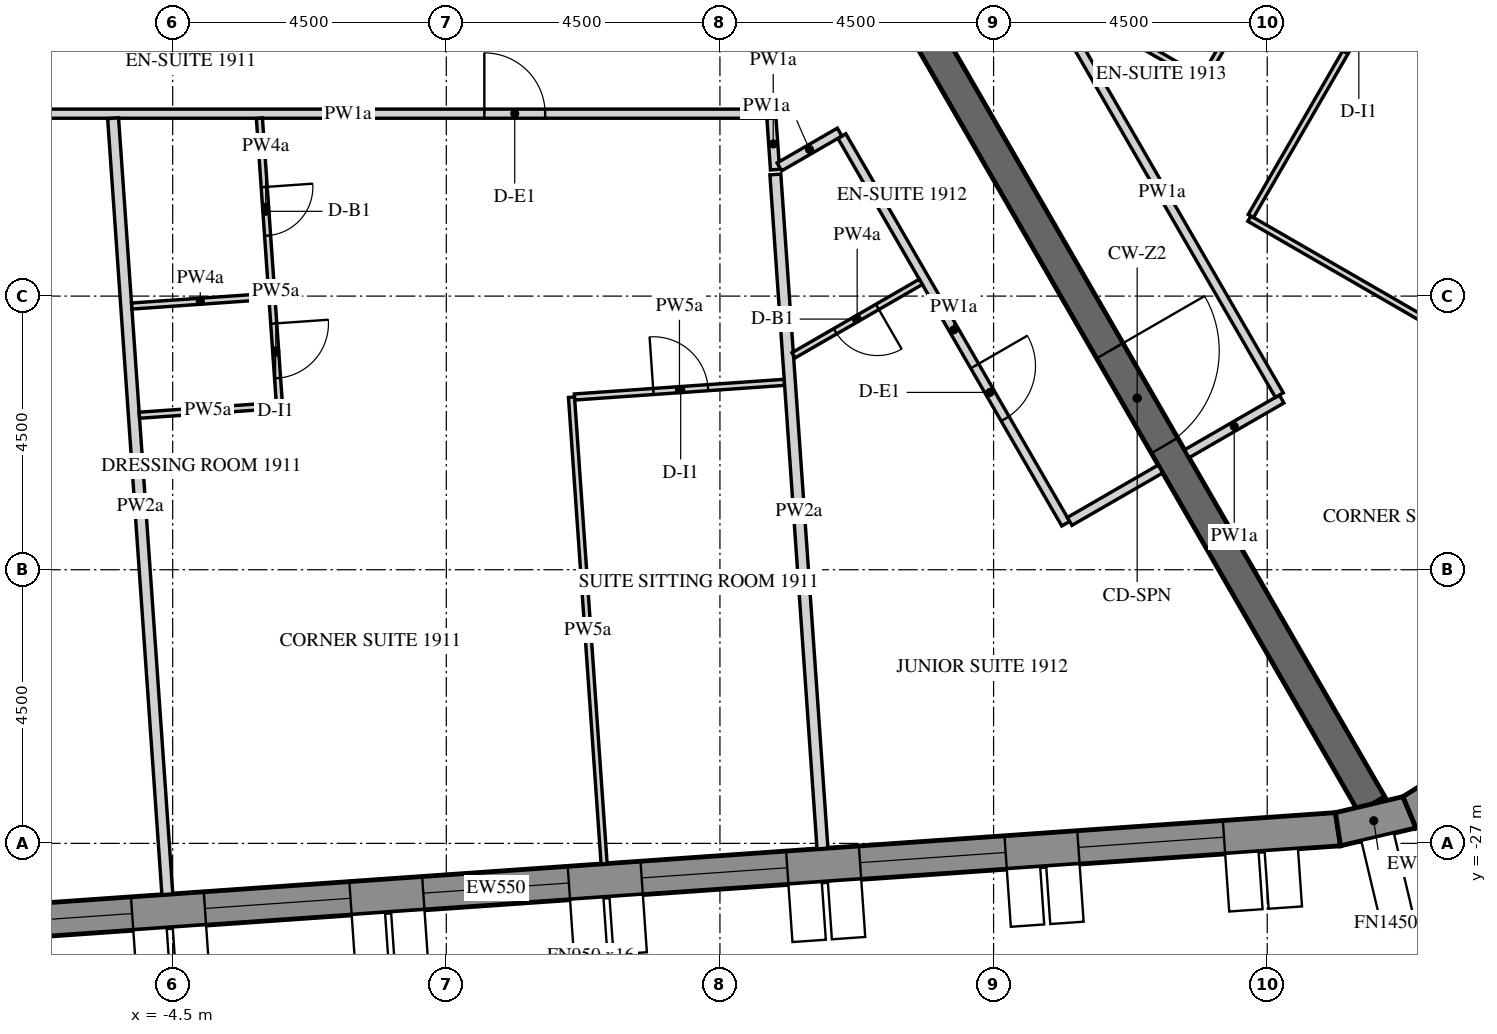
"""IFC4 building model, lengths in metres.
Left out: names, types, materials, properties, quantities, classifications, styles, units other than length and angle.
Written with IfcOpenShell. Run it as: python <this file> out.ifc"""

import sys

from ifc_helpers import new_model, si_unit, direction, frame, frame_2d, origin, place, context, subcontext, project, spatial, polyline, rectangle, outline, extrude, element, fill, save


model = new_model("IFC4")
c1 = context("Model", 3, precision=1e-05, world=origin(), true_north=direction((0.0, 1.0)))
c2 = subcontext(c1, "Body", "Model", "MODEL_VIEW")
j1 = project(units=[si_unit("LENGTHUNIT", "METRE"), si_unit("PLANEANGLEUNIT", "RADIAN")], contexts=[c1])
p1 = place(None, origin())
s1 = spatial("IfcSite", under=j1, at=p1, CompositionType="ELEMENT")
p2 = place(p1, origin())
s2 = spatial("IfcBuilding", under=s1, at=p2, CompositionType="ELEMENT")
p3 = place(p2, frame((0.0, 0.0, 238.5)))
s3 = spatial("IfcBuildingStorey", under=s2, at=p3, CompositionType="ELEMENT", Elevation=238.5)
p4 = place(p3, frame((-13.026, -28.704, -0.15), z_axis=(0.0, 0.0, 1.0), x_axis=(0.99756406806, 0.069756219185, 0.0)))
e1 = element("IfcWall", 1, at=p4, inside=s3, PredefinedType="SOLIDWALL", context=c2, shape_type="SweptSolid", body=[
    extrude(outline(polyline([(-0.026, -0.275), (27.78, -0.275), (27.735, 0.275), (0.026, 0.275), (-0.026, -0.275)])), origin(), (0.0, 0.0, 1.0), 3.9),
])
p5 = place(p4, frame((1.879, 0.0, 1.05)))
e2 = element("IfcOpeningElement", 2, at=p5, cuts=e1, PredefinedType="OPENING", context=c2, shape_type="SweptSolid", body=[
    extrude(rectangle(XDim=2.4, YDim=2.4, at=frame_2d((1.2, 1.2))), frame((0.0, 0.285, 0.0), z_axis=(0.0, -1.0, 0.0), x_axis=(1.0, 0.0, 0.0)), (0.0, 0.0, 1.0), 0.57),
])
p6 = place(p4, frame((5.479, 0.0, 1.05)))
e3 = element("IfcOpeningElement", 3, at=p6, cuts=e1, PredefinedType="OPENING", context=c2, shape_type="SweptSolid", body=[
    extrude(rectangle(XDim=2.4, YDim=2.4, at=frame_2d((1.2, 1.2))), frame((0.0, 0.285, 0.0), z_axis=(0.0, -1.0, 0.0), x_axis=(1.0, 0.0, 0.0)), (0.0, 0.0, 1.0), 0.57),
])
p7 = place(p4, frame((9.079, 0.0, 1.05)))
e4 = element("IfcOpeningElement", 4, at=p7, cuts=e1, PredefinedType="OPENING", context=c2, shape_type="SweptSolid", body=[
    extrude(rectangle(XDim=2.4, YDim=2.4, at=frame_2d((1.2, 1.2))), frame((0.0, 0.285, 0.0), z_axis=(0.0, -1.0, 0.0), x_axis=(1.0, 0.0, 0.0)), (0.0, 0.0, 1.0), 0.57),
])
p8 = place(p4, frame((12.679, 0.0, 1.05)))
e5 = element("IfcOpeningElement", 5, at=p8, cuts=e1, PredefinedType="OPENING", context=c2, shape_type="SweptSolid", body=[
    extrude(rectangle(XDim=2.4, YDim=2.4, at=frame_2d((1.2, 1.2))), frame((0.0, 0.285, 0.0), z_axis=(0.0, -1.0, 0.0), x_axis=(1.0, 0.0, 0.0)), (0.0, 0.0, 1.0), 0.57),
])
p9 = place(p4, frame((16.279, 0.0, 1.05)))
e6 = element("IfcOpeningElement", 6, at=p9, cuts=e1, PredefinedType="OPENING", context=c2, shape_type="SweptSolid", body=[
    extrude(rectangle(XDim=2.4, YDim=2.4, at=frame_2d((1.2, 1.2))), frame((0.0, 0.285, 0.0), z_axis=(0.0, -1.0, 0.0), x_axis=(1.0, 0.0, 0.0)), (0.0, 0.0, 1.0), 0.57),
])
p10 = place(p4, frame((19.879, 0.0, 1.05)))
e7 = element("IfcOpeningElement", 7, at=p10, cuts=e1, PredefinedType="OPENING", context=c2, shape_type="SweptSolid", body=[
    extrude(rectangle(XDim=2.4, YDim=2.4, at=frame_2d((1.2, 1.2))), frame((0.0, 0.285, 0.0), z_axis=(0.0, -1.0, 0.0), x_axis=(1.0, 0.0, 0.0)), (0.0, 0.0, 1.0), 0.57),
])
p11 = place(p4, frame((23.479, 0.0, 1.05)))
e8 = element("IfcOpeningElement", 8, at=p11, cuts=e1, PredefinedType="OPENING", context=c2, shape_type="SweptSolid", body=[
    extrude(rectangle(XDim=2.4, YDim=2.4, at=frame_2d((1.2, 1.2))), frame((0.0, 0.285, 0.0), z_axis=(0.0, -1.0, 0.0), x_axis=(1.0, 0.0, 0.0)), (0.0, 0.0, 1.0), 0.57),
])
p12 = place(p3, frame((14.664, -26.767, -0.15), z_axis=(0.0, 0.0, 1.0), x_axis=(0.973063591128, 0.230536868247, 0.0)))
e9 = element("IfcWall", 9, at=p12, inside=s3, PredefinedType="SOLIDWALL", context=c2, shape_type="SweptSolid", body=[
    extrude(outline(polyline([(-0.022, -0.275), (1.253, -0.275), (1.163, 0.275), (0.022, 0.275), (-0.022, -0.275)])), origin(), (0.0, 0.0, 1.0), 3.9),
])
p13 = place(p3, frame((15.84, -26.489, -0.15), z_axis=(0.0, 0.0, 1.0), x_axis=(0.848009655012, 0.52998077796, 0.0)))
e10 = element("IfcWall", 10, at=p13, inside=s3, PredefinedType="SOLIDWALL", context=c2, shape_type="SweptSolid", body=[
    extrude(outline(polyline([(-0.045, -0.275), (1.253, -0.275), (1.163, 0.275), (0.045, 0.275), (-0.045, -0.275)])), origin(), (0.0, 0.0, 1.0), 3.9),
])
p14 = place(p3, frame((7.506, -13.0, -0.15), z_axis=(0.0, 0.0, 1.0), x_axis=(0.499988271576, -0.866032175087, 0.0)))
e11 = element("IfcWall", 11, at=p14, inside=s3, PredefinedType="SHEAR", context=c2, shape_type="SweptSolid", body=[
    extrude(rectangle(XDim=15.424, YDim=0.5, at=frame_2d((7.712, 0.0))), origin(), (0.0, 0.0, 1.0), 3.9),
])
p15 = place(p14, frame((6.812, 0.0, 0.15)))
e12 = element("IfcOpeningElement", 12, at=p15, cuts=e11, PredefinedType="OPENING", context=c2, shape_type="SweptSolid", body=[
    extrude(rectangle(XDim=1.8, YDim=2.4, at=frame_2d((0.9, 1.2))), frame((0.0, 0.26, 0.0), z_axis=(0.0, -1.0, 0.0), x_axis=(1.0, 0.0, 0.0)), (0.0, 0.0, 1.0), 0.52),
])
p16 = place(p3, frame((-8.574, -15.0, 0.0), z_axis=(0.0, 0.0, 1.0), x_axis=(1.0, 0.0, 0.0)))
e13 = element("IfcWall", 13, at=p16, inside=s3, PredefinedType="PARTITIONING", context=c2, shape_type="SweptSolid", body=[
    extrude(rectangle(XDim=13.915, YDim=0.15, at=frame_2d((6.958, 0.0))), origin(), (0.0, 0.0, 1.0), 2.838),
])
p17 = place(p16, frame((1.001, 0.0, 0.0)))
e14 = element("IfcOpeningElement", 14, at=p17, cuts=e13, PredefinedType="OPENING", context=c2, shape_type="SweptSolid", body=[
    extrude(rectangle(XDim=1.0, YDim=2.1, at=frame_2d((0.5, 1.05))), frame((0.0, 0.085, 0.0), z_axis=(0.0, -1.0, 0.0), x_axis=(1.0, 0.0, 0.0)), (0.0, 0.0, 1.0), 0.17),
])
p18 = place(p16, frame((9.199, 0.0, 0.0)))
e15 = element("IfcOpeningElement", 15, at=p18, cuts=e13, PredefinedType="OPENING", context=c2, shape_type="SweptSolid", body=[
    extrude(rectangle(XDim=1.0, YDim=2.1, at=frame_2d((0.5, 1.05))), frame((0.0, 0.085, 0.0), z_axis=(0.0, -1.0, 0.0), x_axis=(1.0, 0.0, 0.0)), (0.0, 0.0, 1.0), 0.17),
])
p19 = place(p3, frame((5.347, -15.075, 0.0), z_axis=(0.0, 0.0, 1.0), x_axis=(0.069731635013, -0.997565786842, 0.0)))
e16 = element("IfcWall", 16, at=p19, inside=s3, PredefinedType="PARTITIONING", context=c2, shape_type="SweptSolid", body=[
    extrude(rectangle(XDim=0.847, YDim=0.15, at=frame_2d((0.424, 0.0))), origin(), (0.0, 0.0, 1.0), 2.838),
])
p20 = place(p3, frame((6.506, -15.368, 0.0), z_axis=(0.0, 0.0, 1.0), x_axis=(0.499995202058, -0.86602817386, 0.0)))
e17 = element("IfcWall", 17, at=p20, inside=s3, PredefinedType="PARTITIONING", context=c2, shape_type="SweptSolid", body=[
    extrude(rectangle(XDim=7.361, YDim=0.15, at=frame_2d((3.68, 0.0))), origin(), (0.0, 0.0, 1.0), 2.838),
])
p21 = place(p20, frame((4.368, 0.0, 0.0)))
e18 = element("IfcOpeningElement", 18, at=p21, cuts=e17, PredefinedType="OPENING", context=c2, shape_type="SweptSolid", body=[
    extrude(rectangle(XDim=1.0, YDim=2.1, at=frame_2d((0.5, 1.05))), frame((0.0, 0.085, 0.0), z_axis=(0.0, -1.0, 0.0), x_axis=(1.0, 0.0, 0.0)), (0.0, 0.0, 1.0), 0.17),
])
p22 = place(p3, frame((10.251, -21.705, 0.0), z_axis=(0.0, 0.0, 1.0), x_axis=(0.866013532718, 0.500020560727, 0.0)))
e19 = element("IfcWall", 19, at=p22, inside=s3, PredefinedType="PARTITIONING", context=c2, shape_type="SweptSolid", body=[
    extrude(rectangle(XDim=1.725, YDim=0.15, at=frame_2d((0.863, 0.0))), origin(), (0.0, 0.0, 1.0), 2.838),
])
p23 = place(p3, frame((5.478, -15.875, 0.0), z_axis=(0.0, 0.0, 1.0), x_axis=(0.866000689289, 0.500042804318, 0.0)))
e20 = element("IfcWall", 20, at=p23, inside=s3, PredefinedType="PARTITIONING", context=c2, shape_type="SweptSolid", body=[
    extrude(rectangle(XDim=1.144, YDim=0.15, at=frame_2d((0.572, 0.0))), origin(), (0.0, 0.0, 1.0), 2.838),
])
p24 = place(p3, frame((12.178, -20.593, 0.0), z_axis=(0.0, 0.0, 1.0), x_axis=(0.866047807691, 0.499961193289, 0.0)))
e21 = element("IfcWall", 21, at=p24, inside=s3, PredefinedType="PARTITIONING", context=c2, shape_type="SweptSolid", body=[
    extrude(rectangle(XDim=1.8, YDim=0.15, at=frame_2d((0.9, 0.0))), origin(), (0.0, 0.0, 1.0), 2.838),
])
p25 = place(p3, frame((13.699, -19.628, 0.0), z_axis=(0.0, 0.0, 1.0), x_axis=(-0.499993780622, 0.866028994514, 0.0)))
e22 = element("IfcWall", 22, at=p25, inside=s3, PredefinedType="PARTITIONING", context=c2, shape_type="SweptSolid", body=[
    extrude(rectangle(XDim=7.711, YDim=0.15, at=frame_2d((3.855, 0.0))), origin(), (0.0, 0.0, 1.0), 2.838),
])
p26 = place(p3, frame((-4.587, -27.838, 0.0), z_axis=(0.0, 0.0, 1.0), x_axis=(-0.069764754112, 0.997563471206, 0.0)))
e23 = element("IfcWall", 23, at=p26, inside=s3, PredefinedType="PARTITIONING", context=c2, shape_type="SweptSolid", body=[
    extrude(rectangle(XDim=12.794, YDim=0.18, at=frame_2d((6.397, 0.0))), origin(), (0.0, 0.0, 1.0), 2.838),
])
p27 = place(p3, frame((-3.074, -15.075, 0.0), z_axis=(0.0, 0.0, 1.0), x_axis=(0.069798496539, -0.99756111085, 0.0)))
e24 = element("IfcWall", 24, at=p27, inside=s3, PredefinedType="PARTITIONING", context=c2, shape_type="SweptSolid", body=[
    extrude(rectangle(XDim=2.935, YDim=0.1, at=frame_2d((1.467, 0.0))), origin(), (0.0, 0.0, 1.0), 2.838),
])
p28 = place(p27, frame((1.135, 0.0, 0.0)))
e25 = element("IfcOpeningElement", 25, at=p28, cuts=e24, PredefinedType="OPENING", context=c2, shape_type="SweptSolid", body=[
    extrude(rectangle(XDim=0.8, YDim=2.1, at=frame_2d((0.4, 1.05))), frame((0.0, 0.06, 0.0), z_axis=(0.0, -1.0, 0.0), x_axis=(1.0, 0.0, 0.0)), (0.0, 0.0, 1.0), 0.12),
])
p29 = place(p3, frame((-2.866, -18.052, 0.0), z_axis=(0.0, 0.0, 1.0), x_axis=(0.069750000204, -0.997564502913, 0.0)))
e26 = element("IfcWall", 26, at=p29, inside=s3, PredefinedType="PARTITIONING", context=c2, shape_type="SweptSolid", body=[
    extrude(rectangle(XDim=1.75, YDim=0.1, at=frame_2d((0.875, 0.0))), origin(), (0.0, 0.0, 1.0), 2.838),
])
p30 = place(p29, frame((0.4, 0.0, 0.0)))
e27 = element("IfcOpeningElement", 27, at=p30, cuts=e26, PredefinedType="OPENING", context=c2, shape_type="SweptSolid", body=[
    extrude(rectangle(XDim=0.9, YDim=2.1, at=frame_2d((0.45, 1.05))), frame((0.0, 0.06, 0.0), z_axis=(0.0, -1.0, 0.0), x_axis=(1.0, 0.0, 0.0)), (0.0, 0.0, 1.0), 0.12),
])
p31 = place(p3, frame((-2.793, -19.802, 0.0), z_axis=(0.0, 0.0, 1.0), x_axis=(-0.997562351999, -0.069780755754, 0.0)))
e28 = element("IfcWall", 28, at=p31, inside=s3, PredefinedType="PARTITIONING", context=c2, shape_type="SweptSolid", body=[
    extrude(rectangle(XDim=2.26, YDim=0.1, at=frame_2d((1.13, 0.0))), origin(), (0.0, 0.0, 1.0), 2.838),
])
p32 = place(p3, frame((2.595, -27.335, 0.0), z_axis=(0.0, 0.0, 1.0), x_axis=(-0.069769427287, 0.997563144375, 0.0)))
e29 = element("IfcWall", 29, at=p32, inside=s3, PredefinedType="PARTITIONING", context=c2, shape_type="SweptSolid", body=[
    extrude(rectangle(XDim=7.691, YDim=0.1, at=frame_2d((3.846, 0.0))), origin(), (0.0, 0.0, 1.0), 2.838),
])
p33 = place(p3, frame((2.109, -19.659, 0.0), z_axis=(0.0, 0.0, 1.0), x_axis=(0.997566776398, 0.069717477193, 0.0)))
e30 = element("IfcWall", 30, at=p33, inside=s3, PredefinedType="PARTITIONING", context=c2, shape_type="SweptSolid", body=[
    extrude(rectangle(XDim=3.46, YDim=0.1, at=frame_2d((1.73, 0.0))), origin(), (0.0, 0.0, 1.0), 2.838),
])
p34 = place(p33, frame((1.3, 0.0, 0.0)))
e31 = element("IfcOpeningElement", 31, at=p34, cuts=e30, PredefinedType="OPENING", context=c2, shape_type="SweptSolid", body=[
    extrude(rectangle(XDim=0.9, YDim=2.1, at=frame_2d((0.45, 1.05))), frame((0.0, 0.06, 0.0), z_axis=(0.0, -1.0, 0.0), x_axis=(1.0, 0.0, 0.0)), (0.0, 0.0, 1.0), 0.12),
])
p35 = place(p3, frame((6.186, -27.084, 0.0), z_axis=(0.0, 0.0, 1.0), x_axis=(-0.069737079037, 0.99756540628, 0.0)))
e32 = element("IfcWall", 32, at=p35, inside=s3, PredefinedType="PARTITIONING", context=c2, shape_type="SweptSolid", body=[
    extrude(rectangle(XDim=11.112, YDim=0.18, at=frame_2d((5.556, 0.0))), origin(), (0.0, 0.0, 1.0), 2.838),
])
p36 = place(p3, frame((-5.174, -18.164, 0.0), z_axis=(0.0, 0.0, 1.0), x_axis=(0.997562351999, 0.069780755754, 0.0)))
e33 = element("IfcWall", 33, at=p36, inside=s3, PredefinedType="PARTITIONING", context=c2, shape_type="SweptSolid", body=[
    extrude(rectangle(XDim=2.26, YDim=0.1, at=frame_2d((1.13, 0.0))), origin(), (0.0, 0.0, 1.0), 2.838),
])
p37 = place(p3, frame((7.803, -17.765, 0.0), z_axis=(0.0, 0.0, 1.0), x_axis=(-0.865997239347, -0.500048779063, 0.0)))
e34 = element("IfcWall", 34, at=p37, inside=s3, PredefinedType="PARTITIONING", context=c2, shape_type="SweptSolid", body=[
    extrude(rectangle(XDim=2.418, YDim=0.1, at=frame_2d((1.209, 0.0))), origin(), (0.0, 0.0, 1.0), 2.838),
])
p38 = place(p37, frame((0.825, 0.0, 0.0)))
e35 = element("IfcOpeningElement", 35, at=p38, cuts=e34, PredefinedType="OPENING", context=c2, shape_type="SweptSolid", body=[
    extrude(rectangle(XDim=0.8, YDim=2.1, at=frame_2d((0.4, 1.05))), frame((0.0, 0.06, 0.0), z_axis=(0.0, -1.0, 0.0), x_axis=(1.0, 0.0, 0.0)), (0.0, 0.0, 1.0), 0.12),
])
p39 = place(p3, frame((13.717, -12.242, 0.0), z_axis=(0.0, 0.0, 1.0), x_axis=(-0.499990435942, -0.866030925526, 0.0)))
e36 = element("IfcWall", 36, at=p39, inside=s3, PredefinedType="PARTITIONING", context=c2, shape_type="SweptSolid", body=[
    extrude(rectangle(XDim=2.55, YDim=0.1, at=frame_2d((1.275, 0.0))), origin(), (0.0, 0.0, 1.0), 2.838),
])
p40 = place(p3, frame((12.399, -14.425, 0.0), z_axis=(0.0, 0.0, 1.0), x_axis=(-0.866018616679, 0.500011755427, 0.0)))
e37 = element("IfcWall", 37, at=p40, inside=s3, PredefinedType="PARTITIONING", context=c2, shape_type="SweptSolid", body=[
    extrude(rectangle(XDim=2.8, YDim=0.1, at=frame_2d((1.4, 0.0))), origin(), (0.0, 0.0, 1.0), 2.838),
])
p41 = place(p3, frame((19.831, -20.551, 0.0), z_axis=(0.0, 0.0, 1.0), x_axis=(-0.866025084624, 0.500000552801, 0.0)))
e38 = element("IfcWall", 38, at=p41, inside=s3, PredefinedType="PARTITIONING", context=c2, shape_type="SweptSolid", body=[
    extrude(rectangle(XDim=7.65, YDim=0.1, at=frame_2d((3.825, 0.0))), origin(), (0.0, 0.0, 1.0), 2.838),
])
p42 = place(p3, frame((13.231, -16.683, 0.0), z_axis=(0.0, 0.0, 1.0), x_axis=(0.499995846692, 0.866027801685, 0.0)))
e39 = element("IfcWall", 39, at=p42, inside=s3, PredefinedType="PARTITIONING", context=c2, shape_type="SweptSolid", body=[
    extrude(rectangle(XDim=7.06, YDim=0.1, at=frame_2d((3.53, 0.0))), origin(), (0.0, 0.0, 1.0), 2.838),
])
p43 = place(p42, frame((3.1, 0.0, 0.0)))
e40 = element("IfcOpeningElement", 40, at=p43, cuts=e39, PredefinedType="OPENING", context=c2, shape_type="SweptSolid", body=[
    extrude(rectangle(XDim=0.9, YDim=2.1, at=frame_2d((0.45, 1.05))), frame((0.0, 0.06, 0.0), z_axis=(0.0, -1.0, 0.0), x_axis=(1.0, 0.0, 0.0)), (0.0, 0.0, 1.0), 0.12),
])
p44 = place(p3, frame((23.431, -14.316, 0.0), z_axis=(0.0, 0.0, 1.0), x_axis=(-0.866024931941, 0.500000817256, 0.0)))
e41 = element("IfcWall", 41, at=p44, inside=s3, PredefinedType="PARTITIONING", context=c2, shape_type="SweptSolid", body=[
    extrude(rectangle(XDim=12.375, YDim=0.18, at=frame_2d((6.188, 0.0))), origin(), (0.0, 0.0, 1.0), 2.838),
])
p45 = place(p6, frame((0.0, 0.205, 0.0)))
e42 = element("IfcWindow", 42, at=p45, inside=s3, PartitioningType="DOUBLE_PANEL_VERTICAL", PredefinedType="WINDOW", context=c2, shape_type="SweptSolid", body=[
    extrude(rectangle(XDim=2.4, YDim=2.4, at=frame_2d((1.2, 1.2))), frame((0.0, 0.03, 0.0), z_axis=(0.0, -1.0, 0.0), x_axis=(1.0, 0.0, 0.0)), (0.0, 0.0, 1.0), 0.06),
])
fill(e3, e42)
p46 = place(p7, frame((0.0, 0.205, 0.0)))
e43 = element("IfcWindow", 43, at=p46, inside=s3, PartitioningType="DOUBLE_PANEL_VERTICAL", PredefinedType="WINDOW", context=c2, shape_type="SweptSolid", body=[
    extrude(rectangle(XDim=2.4, YDim=2.4, at=frame_2d((1.2, 1.2))), frame((0.0, 0.03, 0.0), z_axis=(0.0, -1.0, 0.0), x_axis=(1.0, 0.0, 0.0)), (0.0, 0.0, 1.0), 0.06),
])
fill(e4, e43)
p47 = place(p8, frame((0.0, 0.205, 0.0)))
e44 = element("IfcWindow", 44, at=p47, inside=s3, PartitioningType="DOUBLE_PANEL_VERTICAL", PredefinedType="WINDOW", context=c2, shape_type="SweptSolid", body=[
    extrude(rectangle(XDim=2.4, YDim=2.4, at=frame_2d((1.2, 1.2))), frame((0.0, 0.03, 0.0), z_axis=(0.0, -1.0, 0.0), x_axis=(1.0, 0.0, 0.0)), (0.0, 0.0, 1.0), 0.06),
])
fill(e5, e44)
p48 = place(p9, frame((0.0, 0.205, 0.0)))
e45 = element("IfcWindow", 45, at=p48, inside=s3, PartitioningType="DOUBLE_PANEL_VERTICAL", PredefinedType="WINDOW", context=c2, shape_type="SweptSolid", body=[
    extrude(rectangle(XDim=2.4, YDim=2.4, at=frame_2d((1.2, 1.2))), frame((0.0, 0.03, 0.0), z_axis=(0.0, -1.0, 0.0), x_axis=(1.0, 0.0, 0.0)), (0.0, 0.0, 1.0), 0.06),
])
fill(e6, e45)
p49 = place(p10, frame((0.0, 0.205, 0.0)))
e46 = element("IfcWindow", 46, at=p49, inside=s3, PartitioningType="DOUBLE_PANEL_VERTICAL", PredefinedType="WINDOW", context=c2, shape_type="SweptSolid", body=[
    extrude(rectangle(XDim=2.4, YDim=2.4, at=frame_2d((1.2, 1.2))), frame((0.0, 0.03, 0.0), z_axis=(0.0, -1.0, 0.0), x_axis=(1.0, 0.0, 0.0)), (0.0, 0.0, 1.0), 0.06),
])
fill(e7, e46)
p50 = place(p11, frame((0.0, 0.205, 0.0)))
e47 = element("IfcWindow", 47, at=p50, inside=s3, PartitioningType="DOUBLE_PANEL_VERTICAL", PredefinedType="WINDOW", context=c2, shape_type="SweptSolid", body=[
    extrude(rectangle(XDim=2.4, YDim=2.4, at=frame_2d((1.2, 1.2))), frame((0.0, 0.03, 0.0), z_axis=(0.0, -1.0, 0.0), x_axis=(1.0, 0.0, 0.0)), (0.0, 0.0, 1.0), 0.06),
])
fill(e8, e47)
p51 = place(p15, origin())
e48 = element("IfcDoor", 48, at=p51, inside=s3, OperationType="DOUBLE_DOOR_SINGLE_SWING", PredefinedType="DOOR", context=c2, shape_type="SweptSolid", body=[
    extrude(rectangle(XDim=1.8, YDim=2.4, at=frame_2d((0.9, 1.2))), frame((0.0, 0.025, 0.0), z_axis=(0.0, -1.0, 0.0), x_axis=(1.0, 0.0, 0.0)), (0.0, 0.0, 1.0), 0.05),
])
fill(e12, e48)
p52 = place(p18, origin())
e49 = element("IfcDoor", 49, at=p52, inside=s3, OperationType="SINGLE_SWING_RIGHT", PredefinedType="DOOR", context=c2, shape_type="SweptSolid", body=[
    extrude(rectangle(XDim=1.0, YDim=2.1, at=frame_2d((0.5, 1.05))), frame((0.0, 0.025, 0.0), z_axis=(0.0, -1.0, 0.0), x_axis=(1.0, 0.0, 0.0)), (0.0, 0.0, 1.0), 0.05),
])
fill(e15, e49)
p53 = place(p28, origin())
e50 = element("IfcDoor", 50, at=p53, inside=s3, OperationType="SINGLE_SWING_LEFT", PredefinedType="DOOR", context=c2, shape_type="SweptSolid", body=[
    extrude(rectangle(XDim=0.8, YDim=2.1, at=frame_2d((0.4, 1.05))), frame((0.0, 0.025, 0.0), z_axis=(0.0, -1.0, 0.0), x_axis=(1.0, 0.0, 0.0)), (0.0, 0.0, 1.0), 0.05),
])
fill(e25, e50)
p54 = place(p30, origin())
e51 = element("IfcDoor", 51, at=p54, inside=s3, OperationType="SINGLE_SWING_RIGHT", PredefinedType="DOOR", context=c2, shape_type="SweptSolid", body=[
    extrude(rectangle(XDim=0.9, YDim=2.1, at=frame_2d((0.45, 1.05))), frame((0.0, 0.025, 0.0), z_axis=(0.0, -1.0, 0.0), x_axis=(1.0, 0.0, 0.0)), (0.0, 0.0, 1.0), 0.05),
])
fill(e27, e51)
p55 = place(p34, origin())
e52 = element("IfcDoor", 52, at=p55, inside=s3, OperationType="SINGLE_SWING_LEFT", PredefinedType="DOOR", context=c2, shape_type="SweptSolid", body=[
    extrude(rectangle(XDim=0.9, YDim=2.1, at=frame_2d((0.45, 1.05))), frame((0.0, 0.025, 0.0), z_axis=(0.0, -1.0, 0.0), x_axis=(1.0, 0.0, 0.0)), (0.0, 0.0, 1.0), 0.05),
])
fill(e31, e52)
p56 = place(p21, origin())
e53 = element("IfcDoor", 53, at=p56, inside=s3, OperationType="SINGLE_SWING_RIGHT", PredefinedType="DOOR", context=c2, shape_type="SweptSolid", body=[
    extrude(rectangle(XDim=1.0, YDim=2.1, at=frame_2d((0.5, 1.05))), frame((0.0, 0.025, 0.0), z_axis=(0.0, -1.0, 0.0), x_axis=(1.0, 0.0, 0.0)), (0.0, 0.0, 1.0), 0.05),
])
fill(e18, e53)
p57 = place(p38, origin())
e54 = element("IfcDoor", 54, at=p57, inside=s3, OperationType="SINGLE_SWING_LEFT", PredefinedType="DOOR", context=c2, shape_type="SweptSolid", body=[
    extrude(rectangle(XDim=0.8, YDim=2.1, at=frame_2d((0.4, 1.05))), frame((0.0, 0.025, 0.0), z_axis=(0.0, -1.0, 0.0), x_axis=(1.0, 0.0, 0.0)), (0.0, 0.0, 1.0), 0.05),
])
fill(e35, e54)
p58 = place(p43, origin())
e55 = element("IfcDoor", 55, at=p58, inside=s3, OperationType="SINGLE_SWING_LEFT", PredefinedType="DOOR", context=c2, shape_type="SweptSolid", body=[
    extrude(rectangle(XDim=0.9, YDim=2.1, at=frame_2d((0.45, 1.05))), frame((0.0, 0.025, 0.0), z_axis=(0.0, -1.0, 0.0), x_axis=(1.0, 0.0, 0.0)), (0.0, 0.0, 1.0), 0.05),
])
fill(e40, e55)
save(model, sys.argv[1])
